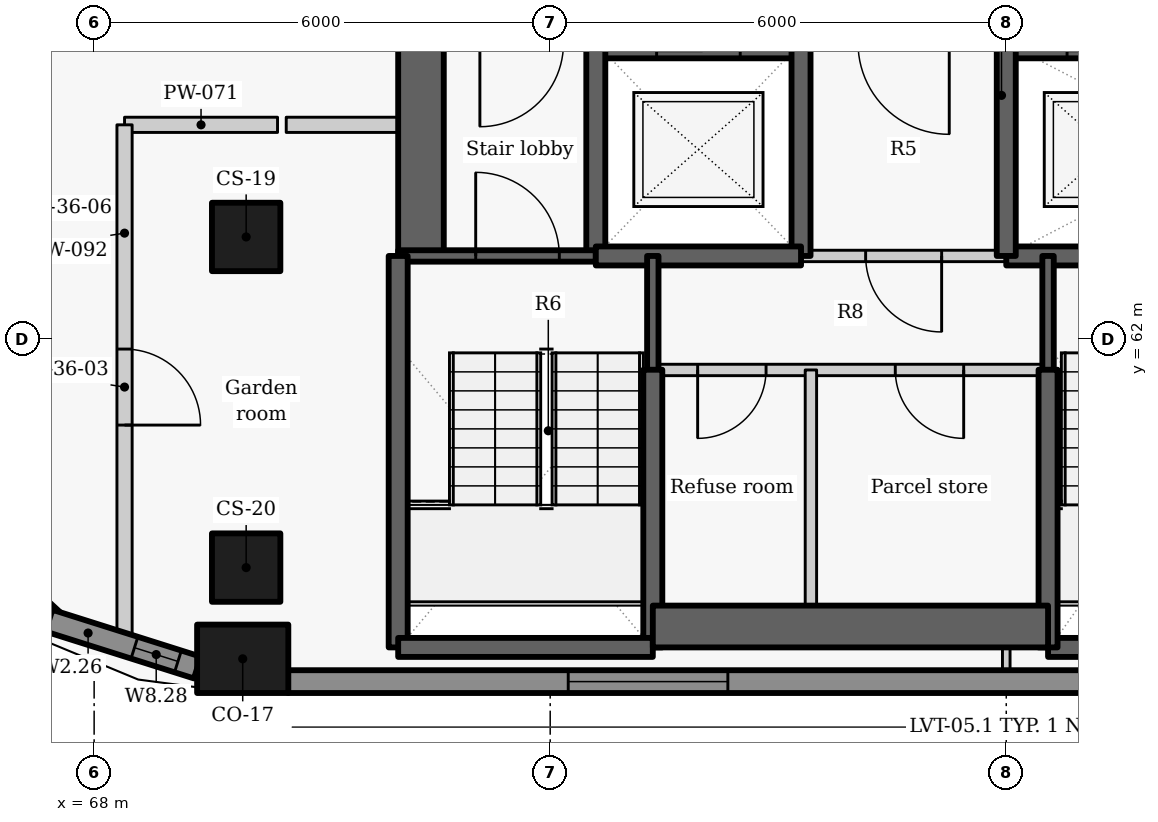
"""IFC4 building model, lengths in metres.
Left out: names, types, materials, properties, quantities, classifications, styles, units other than length and angle.
Written with IfcOpenShell. Run it as: python <this file> out.ifc"""

import sys

from ifc_helpers import new_model, si_unit, direction, frame, frame_2d, origin, origin_2d, place, context, subcontext, project, spatial, rectangle, extrude, element, fill, save


model = new_model("IFC4")
c1 = context("Model", 3, precision=1e-05, world=origin(), true_north=direction((0.0, 1.0)))
c2 = subcontext(c1, "Body", "Model", "MODEL_VIEW")
j1 = project(units=[si_unit("LENGTHUNIT", "METRE"), si_unit("PLANEANGLEUNIT", "RADIAN")], contexts=[c1])
p1 = place(None, origin())
s1 = spatial("IfcSite", under=j1, at=p1, CompositionType="ELEMENT")
p2 = place(p1, origin())
s2 = spatial("IfcBuilding", under=s1, at=p2, CompositionType="ELEMENT")
p3 = place(p2, frame((0.0, 0.0, 216.3)))
s3 = spatial("IfcBuildingStorey", under=s2, at=p3, CompositionType="ELEMENT", Elevation=216.3)
p4 = place(p3, frame((69.955, 57.8, 0.0), z_axis=(0.0, 0.0, 1.0), x_axis=(1.0, 0.0, 0.0)))
e1 = element("IfcColumn", 1, at=p4, inside=s3, PredefinedType="COLUMN", context=c2, shape_type="SweptSolid", body=[
    extrude(rectangle(XDim=1.2, YDim=0.9, at=origin_2d()), origin(), (0.0, 0.0, 1.0), 3.3),
])
for number, where, z_axis, x_axis in (
    (2, (70.0, 63.35, 0.0), (0.0, 0.0, 1.0), (0.0, -1.0, 0.0)),
    (3, (70.0, 59.0, 0.0), (0.0, 0.0, 1.0), (0.0, -1.0, 0.0)),
):
    element("IfcColumn", number, at=place(p3, frame(where, z_axis=z_axis, x_axis=x_axis)), inside=s3, PredefinedType="COLUMN", context=c2, shape_type="SweptSolid", body=[
        extrude(rectangle(XDim=0.9, YDim=0.9, at=origin_2d()), origin(), (0.0, 0.0, 1.0), 3.3),
    ])
p5 = place(p3, frame((66.022, 59.622, 0.0), z_axis=(0.0, 0.0, 1.0), x_axis=(0.734627852992, -0.678470277616, 0.0)))
e4 = element("IfcWall", 4, at=p5, inside=s3, PredefinedType="SOLIDWALL", context=c2, shape_type="SweptSolid", body=[
    extrude(rectangle(XDim=2.026, YDim=0.3, at=frame_2d((1.013, 0.0))), origin(), (0.0, 0.0, 1.0), 2.05),
])
p6 = place(p5, frame((0.313, 0.0, 0.9)))
e5 = element("IfcOpeningElement", 5, at=p6, cuts=e4, PredefinedType="OPENING", context=c2, shape_type="SweptSolid", body=[
    extrude(rectangle(XDim=0.6, YDim=1.1, at=frame_2d((0.3, 0.55))), frame((0.0, 0.16, 0.0), z_axis=(0.0, -1.0, 0.0), x_axis=(1.0, 0.0, 0.0)), (0.0, 0.0, 1.0), 0.32),
])
p7 = place(p3, frame((67.406, 58.302, 0.0), z_axis=(0.0, 0.0, 1.0), x_axis=(0.953537608367, -0.301274010545, 0.0)))
e6 = element("IfcWall", 6, at=p7, inside=s3, PredefinedType="SOLIDWALL", context=c2, shape_type="SweptSolid", body=[
    extrude(rectangle(XDim=2.048, YDim=0.3, at=frame_2d((1.024, 0.0))), origin(), (0.0, 0.0, 1.0), 2.05),
])
p8 = place(p7, frame((1.18, 0.0, 0.9)))
e7 = element("IfcOpeningElement", 7, at=p8, cuts=e6, PredefinedType="OPENING", context=c2, shape_type="SweptSolid", body=[
    extrude(rectangle(XDim=0.6, YDim=1.1, at=frame_2d((0.3, 0.55))), frame((0.0, 0.16, 0.0), z_axis=(0.0, -1.0, 0.0), x_axis=(1.0, 0.0, 0.0)), (0.0, 0.0, 1.0), 0.32),
])
p9 = place(p3, frame((70.551, 57.5, 0.0), z_axis=(0.0, 0.0, 1.0), x_axis=(1.0, 0.0, 0.0)))
e8 = element("IfcWall", 8, at=p9, inside=s3, PredefinedType="SOLIDWALL", context=c2, shape_type="SweptSolid", body=[
    extrude(rectangle(XDim=18.893, YDim=0.3, at=frame_2d((9.446, 0.0))), origin(), (0.0, 0.0, 1.0), 2.05),
])
p10 = place(p9, frame((3.687, 0.0, 0.9)))
e9 = element("IfcOpeningElement", 9, at=p10, cuts=e8, PredefinedType="OPENING", context=c2, shape_type="SweptSolid", body=[
    extrude(rectangle(XDim=2.1, YDim=1.1, at=frame_2d((1.05, 0.55))), frame((0.0, 0.16, 0.0), z_axis=(0.0, -1.0, 0.0), x_axis=(1.0, 0.0, 0.0)), (0.0, 0.0, 1.0), 0.32),
])
p11 = place(p9, frame((13.109, 0.0, 0.9)))
e10 = element("IfcOpeningElement", 10, at=p11, cuts=e8, PredefinedType="OPENING", context=c2, shape_type="SweptSolid", body=[
    extrude(rectangle(XDim=2.1, YDim=1.1, at=frame_2d((1.05, 0.55))), frame((0.0, 0.16, 0.0), z_axis=(0.0, -1.0, 0.0), x_axis=(1.0, 0.0, 0.0)), (0.0, 0.0, 1.0), 0.32),
])
p12 = place(p3, frame((72.3, 63.1, -0.275), z_axis=(0.0, 0.0, 1.0), x_axis=(0.0, 1.0, 0.0)))
e11 = element("IfcWall", 11, at=p12, inside=s3, PredefinedType="SHEAR", context=c2, shape_type="SweptSolid", body=[
    extrude(rectangle(XDim=9.1, YDim=0.6, at=frame_2d((4.55, 0.0))), origin(), (0.0, 0.0, 1.0), 3.225),
])
p13 = place(p12, frame((3.748, 0.0, 0.275)))
e12 = element("IfcOpeningElement", 12, at=p13, cuts=e11, PredefinedType="OPENING", context=c2, shape_type="SweptSolid", body=[
    extrude(rectangle(XDim=1.5, YDim=2.1, at=frame_2d((0.75, 1.05))), frame((0.0, 0.31, 0.0), z_axis=(0.0, -1.0, 0.0), x_axis=(1.0, 0.0, 0.0)), (0.0, 0.0, 1.0), 0.62),
])
p14 = place(p3, frame((74.597, 65.9, -0.275), z_axis=(0.0, 0.0, 1.0), x_axis=(1.0, 0.0, 0.0)))
e13 = element("IfcWall", 13, at=p14, inside=s3, PredefinedType="SHEAR", context=c2, shape_type="SweptSolid", body=[
    extrude(rectangle(XDim=2.706, YDim=0.4, at=frame_2d((1.353, 0.0))), origin(), (0.0, 0.0, 1.0), 3.225),
])
p15 = place(p14, frame((0.803, 0.0, 0.275)))
e14 = element("IfcOpeningElement", 14, at=p15, cuts=e13, PredefinedType="OPENING", context=c2, shape_type="SweptSolid", body=[
    extrude(rectangle(XDim=1.1, YDim=2.1, at=frame_2d((0.55, 1.05))), frame((0.0, 0.21, 0.0), z_axis=(0.0, -1.0, 0.0), x_axis=(1.0, 0.0, 0.0)), (0.0, 0.0, 1.0), 0.42),
])
p16 = place(p3, frame((79.997, 65.9, -0.275), z_axis=(0.0, 0.0, 1.0), x_axis=(1.0, 0.0, 0.0)))
e15 = element("IfcWall", 15, at=p16, inside=s3, PredefinedType="SHEAR", context=c2, shape_type="SweptSolid", body=[
    extrude(rectangle(XDim=5.406, YDim=0.4, at=frame_2d((2.703, 0.0))), origin(), (0.0, 0.0, 1.0), 3.225),
])
p17 = place(p16, frame((0.803, 0.0, 0.275)))
e16 = element("IfcOpeningElement", 16, at=p17, cuts=e15, PredefinedType="OPENING", context=c2, shape_type="SweptSolid", body=[
    extrude(rectangle(XDim=1.1, YDim=2.1, at=frame_2d((0.55, 1.05))), frame((0.0, 0.21, 0.0), z_axis=(0.0, -1.0, 0.0), x_axis=(1.0, 0.0, 0.0)), (0.0, 0.0, 1.0), 0.42),
])
p18 = place(p3, frame((74.6, 63.1, -0.275), z_axis=(0.0, 0.0, 1.0), x_axis=(0.0, 1.0, 0.0)))
e17 = element("IfcWall", 17, at=p18, inside=s3, PredefinedType="SHEAR", context=c2, shape_type="SweptSolid", body=[
    extrude(rectangle(XDim=2.8, YDim=0.25, at=frame_2d((1.4, 0.0))), origin(), (0.0, 0.0, 1.0), 3.225),
])
p19 = place(p3, frame((72.0, 63.1, -0.275), z_axis=(0.0, 0.0, 1.0), x_axis=(1.0, 0.0, 0.0)))
e18 = element("IfcWall", 18, at=p19, inside=s3, PredefinedType="SHEAR", context=c2, shape_type="SweptSolid", body=[
    extrude(rectangle(XDim=2.6, YDim=0.15, at=frame_2d((1.3, 0.0))), origin(), (0.0, 0.0, 1.0), 3.225),
])
p20 = place(p19, frame((1.02, 0.0, 0.275)))
e19 = element("IfcOpeningElement", 19, at=p20, cuts=e18, PredefinedType="OPENING", context=c2, shape_type="SweptSolid", body=[
    extrude(rectangle(XDim=1.1, YDim=2.1, at=frame_2d((0.55, 1.05))), frame((0.0, 0.085, 0.0), z_axis=(0.0, -1.0, 0.0), x_axis=(1.0, 0.0, 0.0)), (0.0, 0.0, 1.0), 0.17),
])
p21 = place(p3, frame((77.3, 63.1, -0.275), z_axis=(0.0, 0.0, 1.0), x_axis=(0.0, 1.0, 0.0)))
e20 = element("IfcWall", 20, at=p21, inside=s3, PredefinedType="SHEAR", context=c2, shape_type="SweptSolid", body=[
    extrude(rectangle(XDim=2.8, YDim=0.25, at=frame_2d((1.4, 0.0))), origin(), (0.0, 0.0, 1.0), 3.225),
])
p22 = place(p3, frame((74.6, 63.1, -0.275), z_axis=(0.0, 0.0, 1.0), x_axis=(1.0, 0.0, 0.0)))
e21 = element("IfcWall", 21, at=p22, inside=s3, PredefinedType="SHEAR", context=c2, shape_type="SweptSolid", body=[
    extrude(rectangle(XDim=2.7, YDim=0.25, at=frame_2d((1.35, 0.0))), origin(), (0.0, 0.0, 1.0), 3.225),
])
p23 = place(p3, frame((80.0, 63.1, -0.275), z_axis=(0.0, 0.0, 1.0), x_axis=(1.0, 0.0, 0.0)))
e22 = element("IfcWall", 22, at=p23, inside=s3, PredefinedType="SHEAR", context=c2, shape_type="SweptSolid", body=[
    extrude(rectangle(XDim=8.0, YDim=0.25, at=frame_2d((4.0, 0.0))), origin(), (0.0, 0.0, 1.0), 3.225),
])
p24 = place(p23, frame((3.849, 0.0, 0.275)))
e23 = element("IfcOpeningElement", 23, at=p24, cuts=e22, PredefinedType="OPENING", context=c2, shape_type="SweptSolid", body=[
    extrude(rectangle(XDim=1.1, YDim=2.1, at=frame_2d((0.55, 1.05))), frame((0.0, 0.135, 0.0), z_axis=(0.0, -1.0, 0.0), x_axis=(1.0, 0.0, 0.0)), (0.0, 0.0, 1.0), 0.27),
])
p25 = place(p3, frame((80.0, 63.1, -0.275), z_axis=(0.0, 0.0, 1.0), x_axis=(0.0, 1.0, 0.0)))
e24 = element("IfcWall", 24, at=p25, inside=s3, PredefinedType="SHEAR", context=c2, shape_type="SweptSolid", body=[
    extrude(rectangle(XDim=2.8, YDim=0.25, at=frame_2d((1.4, 0.0))), origin(), (0.0, 0.0, 1.0), 3.225),
])
p26 = place(p3, frame((80.0, 63.1, 0.0), z_axis=(0.0, 0.0, 1.0), x_axis=(-1.0, 0.0, 0.0)))
e25 = element("IfcWall", 25, at=p26, inside=s3, PredefinedType="PARTITIONING", context=c2, shape_type="SweptSolid", body=[
    extrude(rectangle(XDim=2.7, YDim=0.15, at=frame_2d((1.35, 0.0))), origin(), (0.0, 0.0, 1.0), 2.95),
])
p27 = place(p26, frame((0.85, 0.0, 0.0)))
e26 = element("IfcOpeningElement", 26, at=p27, cuts=e25, PredefinedType="OPENING", context=c2, shape_type="SweptSolid", body=[
    extrude(rectangle(XDim=1.0, YDim=2.1, at=frame_2d((0.5, 1.05))), frame((0.0, 0.085, 0.0), z_axis=(0.0, -1.0, 0.0), x_axis=(1.0, 0.0, 0.0)), (0.0, 0.0, 1.0), 0.17),
])
p28 = place(p3, frame((75.35, 61.597, -0.275), z_axis=(0.0, 0.0, 1.0), x_axis=(0.0, 1.0, 0.0)))
e27 = element("IfcWall", 27, at=p28, inside=s3, PredefinedType="SHEAR", context=c2, shape_type="SweptSolid", body=[
    extrude(rectangle(XDim=1.503, YDim=0.15, at=frame_2d((0.751, 0.0))), origin(), (0.0, 0.0, 1.0), 3.225),
])
p29 = place(p3, frame((75.35, 57.95, -0.275), z_axis=(0.0, 0.0, 1.0), x_axis=(0.0, 1.0, 0.0)))
e28 = element("IfcWall", 28, at=p29, inside=s3, PredefinedType="SHEAR", context=c2, shape_type="SweptSolid", body=[
    extrude(rectangle(XDim=3.653, YDim=0.25, at=frame_2d((1.827, 0.0))), origin(), (0.0, 0.0, 1.0), 3.225),
])
p30 = place(p3, frame((72.0, 57.95, -0.275), z_axis=(0.0, 0.0, 1.0), x_axis=(0.0, 1.0, 0.0)))
e29 = element("IfcWall", 29, at=p30, inside=s3, PredefinedType="SHEAR", context=c2, shape_type="SweptSolid", body=[
    extrude(rectangle(XDim=5.15, YDim=0.25, at=frame_2d((2.575, 0.0))), origin(), (0.0, 0.0, 1.0), 3.225),
])
p31 = place(p3, frame((72.0, 57.95, -0.275), z_axis=(0.0, 0.0, 1.0), x_axis=(1.0, 0.0, 0.0)))
e30 = element("IfcWall", 30, at=p31, inside=s3, PredefinedType="SHEAR", context=c2, shape_type="SweptSolid", body=[
    extrude(rectangle(XDim=3.35, YDim=0.25, at=frame_2d((1.675, 0.0))), origin(), (0.0, 0.0, 1.0), 3.225),
])
p32 = place(p3, frame((80.55, 57.95, -0.275), z_axis=(0.0, 0.0, 1.0), x_axis=(1.0, 0.0, 0.0)))
e31 = element("IfcWall", 31, at=p32, inside=s3, PredefinedType="SHEAR", context=c2, shape_type="SweptSolid", body=[
    extrude(rectangle(XDim=2.85, YDim=0.25, at=frame_2d((1.425, 0.0))), origin(), (0.0, 0.0, 1.0), 3.225),
])
p33 = place(p3, frame((80.55, 61.597, -0.275), z_axis=(0.0, 0.0, 1.0), x_axis=(0.0, 1.0, 0.0)))
e32 = element("IfcWall", 32, at=p33, inside=s3, PredefinedType="SHEAR", context=c2, shape_type="SweptSolid", body=[
    extrude(rectangle(XDim=1.503, YDim=0.15, at=frame_2d((0.751, 0.0))), origin(), (0.0, 0.0, 1.0), 3.225),
])
p34 = place(p3, frame((80.55, 57.95, -0.275), z_axis=(0.0, 0.0, 1.0), x_axis=(0.0, 1.0, 0.0)))
e33 = element("IfcWall", 33, at=p34, inside=s3, PredefinedType="SHEAR", context=c2, shape_type="SweptSolid", body=[
    extrude(rectangle(XDim=3.653, YDim=0.25, at=frame_2d((1.827, 0.0))), origin(), (0.0, 0.0, 1.0), 3.225),
])
p35 = place(p3, frame((75.35, 58.225, -0.275), z_axis=(0.0, 0.0, 1.0), x_axis=(1.0, 0.0, 0.0)))
e34 = element("IfcWall", 34, at=p35, inside=s3, PredefinedType="SHEAR", context=c2, shape_type="SweptSolid", body=[
    extrude(rectangle(XDim=5.2, YDim=0.55, at=frame_2d((2.6, 0.0))), origin(), (0.0, 0.0, 1.0), 3.225),
])
p36 = place(p3, frame((80.55, 61.6, 0.0), z_axis=(0.0, 0.0, 1.0), x_axis=(-1.0, 0.0, 0.0)))
e35 = element("IfcWall", 35, at=p36, inside=s3, PredefinedType="PARTITIONING", context=c2, shape_type="SweptSolid", body=[
    extrude(rectangle(XDim=5.2, YDim=0.15, at=frame_2d((2.6, 0.0))), origin(), (0.0, 0.0, 1.0), 2.95),
])
p37 = place(p36, frame((3.71, 0.0, 0.0)))
e36 = element("IfcOpeningElement", 36, at=p37, cuts=e35, PredefinedType="OPENING", context=c2, shape_type="SweptSolid", body=[
    extrude(rectangle(XDim=0.9, YDim=2.1, at=frame_2d((0.45, 1.05))), frame((0.0, 0.085, 0.0), z_axis=(0.0, -1.0, 0.0), x_axis=(1.0, 0.0, 0.0)), (0.0, 0.0, 1.0), 0.17),
])
p38 = place(p36, frame((1.11, 0.0, 0.0)))
e37 = element("IfcOpeningElement", 37, at=p38, cuts=e35, PredefinedType="OPENING", context=c2, shape_type="SweptSolid", body=[
    extrude(rectangle(XDim=0.9, YDim=2.1, at=frame_2d((0.45, 1.05))), frame((0.0, 0.085, 0.0), z_axis=(0.0, -1.0, 0.0), x_axis=(1.0, 0.0, 0.0)), (0.0, 0.0, 1.0), 0.17),
])
p39 = place(p3, frame((77.43, 57.95, 0.0), z_axis=(0.0, 0.0, 1.0), x_axis=(0.0, 1.0, 0.0)))
e38 = element("IfcWall", 38, at=p39, inside=s3, PredefinedType="PARTITIONING", context=c2, shape_type="SweptSolid", body=[
    extrude(rectangle(XDim=3.65, YDim=0.15, at=frame_2d((1.825, 0.0))), origin(), (0.0, 0.0, 1.0), 2.95),
])
p40 = place(p3, frame((68.4, 64.825, 0.0), z_axis=(0.0, 0.0, 1.0), x_axis=(1.0, 0.0, 0.0)))
e39 = element("IfcWall", 39, at=p40, inside=s3, PredefinedType="PARTITIONING", context=c2, shape_type="SweptSolid", body=[
    extrude(rectangle(XDim=2.013, YDim=0.2, at=frame_2d((1.006, 0.0))), origin(), (0.0, 0.0, 1.0), 2.43),
])
p41 = place(p3, frame((70.527, 64.825, 0.0), z_axis=(0.0, 0.0, 1.0), x_axis=(1.0, 0.0, 0.0)))
e40 = element("IfcWall", 40, at=p41, inside=s3, PredefinedType="PARTITIONING", context=c2, shape_type="SweptSolid", body=[
    extrude(rectangle(XDim=1.473, YDim=0.2, at=frame_2d((0.736, 0.0))), origin(), (0.0, 0.0, 1.0), 2.95),
])
p42 = place(p3, frame((68.4, 64.825, 0.0), z_axis=(0.0, 0.0, 1.0), x_axis=(0.0, -1.0, 0.0)))
e41 = element("IfcWall", 41, at=p42, inside=s3, PredefinedType="PARTITIONING", context=c2, shape_type="SweptSolid", body=[
    extrude(rectangle(XDim=6.899, YDim=0.2, at=frame_2d((3.449, 0.0))), origin(), (0.0, 0.0, 1.0), 2.03),
])
p43 = place(p42, frame((2.95, 0.0, 0.0)))
e42 = element("IfcOpeningElement", 42, at=p43, cuts=e41, PredefinedType="OPENING", context=c2, shape_type="SweptSolid", body=[
    extrude(rectangle(XDim=1.0, YDim=2.01, at=frame_2d((0.5, 1.005))), frame((0.0, 0.11, 0.0), z_axis=(0.0, -1.0, 0.0), x_axis=(1.0, 0.0, 0.0)), (0.0, 0.0, 1.0), 0.22),
])
p44 = place(p3, frame((80.0, 57.65, 0.0), z_axis=(0.0, 0.0, 1.0), x_axis=(0.0, 1.0, 0.0)))
e43 = element("IfcWall", 43, at=p44, inside=s3, PredefinedType="PARTITIONING", context=c2, shape_type="SweptSolid", body=[
    extrude(rectangle(XDim=0.3, YDim=0.1, at=frame_2d((0.15, 0.0))), origin(), (0.0, 0.0, 1.0), 2.95),
])
p45 = place(p8, origin())
e44 = element("IfcWindow", 44, at=p45, inside=s3, PartitioningType="SINGLE_PANEL", PredefinedType="WINDOW", context=c2, shape_type="SweptSolid", body=[
    extrude(rectangle(XDim=0.6, YDim=1.1, at=frame_2d((0.3, 0.55))), frame((0.0, 0.03, 0.0), z_axis=(0.0, -1.0, 0.0), x_axis=(1.0, 0.0, 0.0)), (0.0, 0.0, 1.0), 0.06),
])
fill(e7, e44)
p46 = place(p10, origin())
e45 = element("IfcWindow", 45, at=p46, inside=s3, PartitioningType="SINGLE_PANEL", PredefinedType="WINDOW", context=c2, shape_type="SweptSolid", body=[
    extrude(rectangle(XDim=2.1, YDim=1.1, at=frame_2d((1.05, 0.55))), frame((0.0, 0.03, 0.0), z_axis=(0.0, -1.0, 0.0), x_axis=(1.0, 0.0, 0.0)), (0.0, 0.0, 1.0), 0.06),
])
fill(e9, e45)
p47 = place(p27, origin())
e46 = element("IfcDoor", 46, at=p47, inside=s3, OperationType="SINGLE_SWING_LEFT", PredefinedType="DOOR", context=c2, shape_type="SweptSolid", body=[
    extrude(rectangle(XDim=1.0, YDim=2.1, at=frame_2d((0.5, 1.05))), frame((0.0, 0.025, 0.0), z_axis=(0.0, -1.0, 0.0), x_axis=(1.0, 0.0, 0.0)), (0.0, 0.0, 1.0), 0.05),
])
fill(e26, e46)
p48 = place(p37, origin())
e47 = element("IfcDoor", 47, at=p48, inside=s3, OperationType="SINGLE_SWING_RIGHT", PredefinedType="DOOR", context=c2, shape_type="SweptSolid", body=[
    extrude(rectangle(XDim=0.9, YDim=2.1, at=frame_2d((0.45, 1.05))), frame((0.0, 0.025, 0.0), z_axis=(0.0, -1.0, 0.0), x_axis=(1.0, 0.0, 0.0)), (0.0, 0.0, 1.0), 0.05),
])
fill(e36, e47)
p49 = place(p38, origin())
e48 = element("IfcDoor", 48, at=p49, inside=s3, OperationType="SINGLE_SWING_LEFT", PredefinedType="DOOR", context=c2, shape_type="SweptSolid", body=[
    extrude(rectangle(XDim=0.9, YDim=2.1, at=frame_2d((0.45, 1.05))), frame((0.0, 0.025, 0.0), z_axis=(0.0, -1.0, 0.0), x_axis=(1.0, 0.0, 0.0)), (0.0, 0.0, 1.0), 0.05),
])
fill(e37, e48)
p50 = place(p20, origin())
e49 = element("IfcDoor", 49, at=p50, inside=s3, OperationType="SINGLE_SWING_LEFT", PredefinedType="DOOR", context=c2, shape_type="SweptSolid", body=[
    extrude(rectangle(XDim=1.1, YDim=2.1, at=frame_2d((0.55, 1.05))), frame((0.0, 0.025, 0.0), z_axis=(0.0, -1.0, 0.0), x_axis=(1.0, 0.0, 0.0)), (0.0, 0.0, 1.0), 0.05),
])
fill(e19, e49)
p51 = place(p43, origin())
e50 = element("IfcDoor", 50, at=p51, inside=s3, OperationType="SINGLE_SWING_RIGHT", PredefinedType="DOOR", context=c2, shape_type="SweptSolid", body=[
    extrude(rectangle(XDim=1.0, YDim=2.01, at=frame_2d((0.5, 1.005))), frame((0.0, 0.025, 0.0), z_axis=(0.0, -1.0, 0.0), x_axis=(1.0, 0.0, 0.0)), (0.0, 0.0, 1.0), 0.05),
])
fill(e42, e50)
save(model, sys.argv[1])
